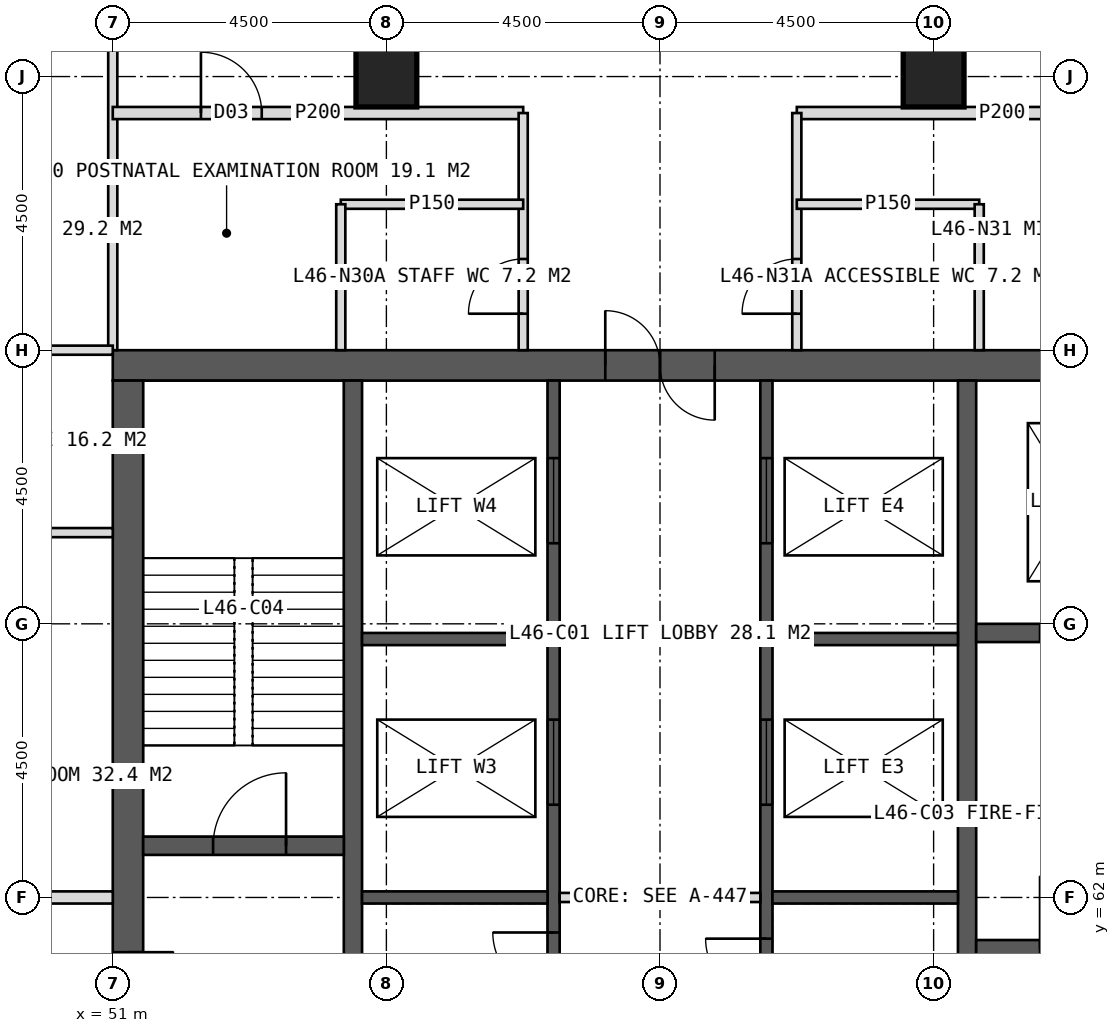
"""IFC4 building model, lengths in metres.
Left out: names, types, materials, properties, quantities, classifications, styles, units other than length and angle.
Written with IfcOpenShell. Run it as: python <this file> out.ifc"""

import sys

from ifc_helpers import new_model, si_unit, direction, frame, frame_2d, origin, origin_2d, place, context, subcontext, project, spatial, rectangle, hollow_rectangle, extrude, element, fill, save


model = new_model("IFC4")
c1 = context("Model", 3, precision=1e-05, world=origin(), true_north=direction((0.0, 1.0)))
c2 = subcontext(c1, "Body", "Model", "MODEL_VIEW")
j1 = project(units=[si_unit("LENGTHUNIT", "METRE"), si_unit("PLANEANGLEUNIT", "RADIAN")], contexts=[c1])
p1 = place(None, origin())
s1 = spatial("IfcSite", under=j1, at=p1, CompositionType="ELEMENT")
p2 = place(p1, origin())
s2 = spatial("IfcBuilding", under=s1, at=p2, CompositionType="ELEMENT")
p3 = place(p2, frame((0.0, 0.0, 193.0)))
s3 = spatial("IfcBuildingStorey", under=s2, at=p3, CompositionType="ELEMENT", Elevation=193.0)
p4 = place(p3, frame((51.0, 70.75, 0.0), z_axis=(0.0, 0.0, 1.0), x_axis=(1.0, 0.0, 0.0)))
e1 = element("IfcWall", 1, at=p4, inside=s3, PredefinedType="SHEAR", context=c2, shape_type="SweptSolid", body=[
    extrude(rectangle(XDim=18.0, YDim=0.5, at=frame_2d((9.0, 0.0))), origin(), (0.0, 0.0, 1.0), 4.0),
])
p5 = place(p4, frame((8.1, 0.0, 0.0)))
e2 = element("IfcOpeningElement", 2, at=p5, cuts=e1, PredefinedType="OPENING", context=c2, shape_type="SweptSolid", body=[
    extrude(rectangle(XDim=1.8, YDim=2.2, at=frame_2d((0.9, 1.1))), frame((0.0, 0.26, 0.0), z_axis=(0.0, -1.0, 0.0), x_axis=(1.0, 0.0, 0.0)), (0.0, 0.0, 1.0), 0.52),
])
p6 = place(p3, frame((51.25, 53.5, 0.0), z_axis=(0.0, 0.0, 1.0), x_axis=(0.0, 1.0, 0.0)))
e3 = element("IfcWall", 3, at=p6, inside=s3, PredefinedType="SHEAR", context=c2, shape_type="SweptSolid", body=[
    extrude(rectangle(XDim=17.0, YDim=0.5, at=frame_2d((8.5, 0.0))), origin(), (0.0, 0.0, 1.0), 4.0),
])
p7 = place(p6, frame((6.1, 0.0, 0.0)))
e4 = element("IfcOpeningElement", 4, at=p7, cuts=e3, PredefinedType="OPENING", context=c2, shape_type="SweptSolid", body=[
    extrude(rectangle(XDim=1.5, YDim=2.2, at=frame_2d((0.75, 1.1))), frame((0.0, 0.26, 0.0), z_axis=(0.0, -1.0, 0.0), x_axis=(1.0, 0.0, 0.0)), (0.0, 0.0, 1.0), 0.52),
])
for number, where, z_axis, x_axis in (
    (5, (54.95, 53.5, 0.0), (0.0, 0.0, 1.0), (0.0, 1.0, 0.0)),
    (6, (65.05, 53.5, 0.0), (0.0, 0.0, 1.0), (0.0, 1.0, 0.0)),
):
    element("IfcWall", number, at=place(p3, frame(where, z_axis=z_axis, x_axis=x_axis)), inside=s3, PredefinedType="SHEAR", context=c2, shape_type="SweptSolid", body=[
        extrude(rectangle(XDim=17.0, YDim=0.3, at=frame_2d((8.5, 0.0))), origin(), (0.0, 0.0, 1.0), 4.0),
    ])
p8 = place(p3, frame((58.25, 53.5, 0.0), z_axis=(0.0, 0.0, 1.0), x_axis=(0.0, 1.0, 0.0)))
e7 = element("IfcWall", 7, at=p8, inside=s3, PredefinedType="SHEAR", context=c2, shape_type="SweptSolid", body=[
    extrude(rectangle(XDim=17.0, YDim=0.2, at=frame_2d((8.5, 0.0))), origin(), (0.0, 0.0, 1.0), 4.0),
])
p9 = place(p8, frame((0.6, 0.0, 0.0)))
e8 = element("IfcOpeningElement", 8, at=p9, cuts=e7, PredefinedType="OPENING", context=c2, shape_type="SweptSolid", body=[
    extrude(rectangle(XDim=1.0, YDim=2.1, at=frame_2d((0.5, 1.05))), frame((0.0, 0.11, 0.0), z_axis=(0.0, -1.0, 0.0), x_axis=(1.0, 0.0, 0.0)), (0.0, 0.0, 1.0), 0.22),
])
p10 = place(p8, frame((2.75, 0.0, 0.0)))
e9 = element("IfcOpeningElement", 9, at=p10, cuts=e7, PredefinedType="OPENING", context=c2, shape_type="SweptSolid", body=[
    extrude(rectangle(XDim=1.0, YDim=2.1, at=frame_2d((0.5, 1.05))), frame((0.0, 0.11, 0.0), z_axis=(0.0, -1.0, 0.0), x_axis=(1.0, 0.0, 0.0)), (0.0, 0.0, 1.0), 0.22),
])
p11 = place(p8, frame((4.824, 0.0, 0.0)))
e10 = element("IfcOpeningElement", 10, at=p11, cuts=e7, PredefinedType="OPENING", context=c2, shape_type="SweptSolid", body=[
    extrude(rectangle(XDim=1.0, YDim=2.1, at=frame_2d((0.5, 1.05))), frame((0.0, 0.11, 0.0), z_axis=(0.0, -1.0, 0.0), x_axis=(1.0, 0.0, 0.0)), (0.0, 0.0, 1.0), 0.22),
])
p12 = place(p8, frame((6.924, 0.0, 0.0)))
e11 = element("IfcOpeningElement", 11, at=p12, cuts=e7, PredefinedType="OPENING", context=c2, shape_type="SweptSolid", body=[
    extrude(rectangle(XDim=1.0, YDim=2.1, at=frame_2d((0.5, 1.05))), frame((0.0, 0.11, 0.0), z_axis=(0.0, -1.0, 0.0), x_axis=(1.0, 0.0, 0.0)), (0.0, 0.0, 1.0), 0.22),
])
p13 = place(p8, frame((10.025, 0.0, 0.0)))
e12 = element("IfcOpeningElement", 12, at=p13, cuts=e7, PredefinedType="OPENING", context=c2, shape_type="SweptSolid", body=[
    extrude(rectangle(XDim=1.4, YDim=2.2, at=frame_2d((0.7, 1.1))), frame((0.0, 0.11, 0.0), z_axis=(0.0, -1.0, 0.0), x_axis=(1.0, 0.0, 0.0)), (0.0, 0.0, 1.0), 0.22),
])
p14 = place(p8, frame((14.325, 0.0, 0.0)))
e13 = element("IfcOpeningElement", 13, at=p14, cuts=e7, PredefinedType="OPENING", context=c2, shape_type="SweptSolid", body=[
    extrude(rectangle(XDim=1.4, YDim=2.2, at=frame_2d((0.7, 1.1))), frame((0.0, 0.11, 0.0), z_axis=(0.0, -1.0, 0.0), x_axis=(1.0, 0.0, 0.0)), (0.0, 0.0, 1.0), 0.22),
])
p15 = place(p3, frame((61.75, 53.5, 0.0), z_axis=(0.0, 0.0, 1.0), x_axis=(0.0, 1.0, 0.0)))
e14 = element("IfcWall", 14, at=p15, inside=s3, PredefinedType="SHEAR", context=c2, shape_type="SweptSolid", body=[
    extrude(rectangle(XDim=17.0, YDim=0.2, at=frame_2d((8.5, 0.0))), origin(), (0.0, 0.0, 1.0), 4.0),
])
p16 = place(p15, frame((0.808, 0.0, 0.0)))
e15 = element("IfcOpeningElement", 15, at=p16, cuts=e14, PredefinedType="OPENING", context=c2, shape_type="SweptSolid", body=[
    extrude(rectangle(XDim=1.0, YDim=2.1, at=frame_2d((0.5, 1.05))), frame((0.0, 0.11, 0.0), z_axis=(0.0, -1.0, 0.0), x_axis=(1.0, 0.0, 0.0)), (0.0, 0.0, 1.0), 0.22),
])
p17 = place(p15, frame((2.958, 0.0, 0.0)))
e16 = element("IfcOpeningElement", 16, at=p17, cuts=e14, PredefinedType="OPENING", context=c2, shape_type="SweptSolid", body=[
    extrude(rectangle(XDim=1.0, YDim=2.1, at=frame_2d((0.5, 1.05))), frame((0.0, 0.11, 0.0), z_axis=(0.0, -1.0, 0.0), x_axis=(1.0, 0.0, 0.0)), (0.0, 0.0, 1.0), 0.22),
])
p18 = place(p15, frame((4.722, 0.0, 0.0)))
e17 = element("IfcOpeningElement", 17, at=p18, cuts=e14, PredefinedType="OPENING", context=c2, shape_type="SweptSolid", body=[
    extrude(rectangle(XDim=1.0, YDim=2.1, at=frame_2d((0.5, 1.05))), frame((0.0, 0.11, 0.0), z_axis=(0.0, -1.0, 0.0), x_axis=(1.0, 0.0, 0.0)), (0.0, 0.0, 1.0), 0.22),
])
p19 = place(p15, frame((6.823, 0.0, 0.0)))
e18 = element("IfcOpeningElement", 18, at=p19, cuts=e14, PredefinedType="OPENING", context=c2, shape_type="SweptSolid", body=[
    extrude(rectangle(XDim=1.0, YDim=2.1, at=frame_2d((0.5, 1.05))), frame((0.0, 0.11, 0.0), z_axis=(0.0, -1.0, 0.0), x_axis=(1.0, 0.0, 0.0)), (0.0, 0.0, 1.0), 0.22),
])
p20 = place(p15, frame((10.025, 0.0, 0.0)))
e19 = element("IfcOpeningElement", 19, at=p20, cuts=e14, PredefinedType="OPENING", context=c2, shape_type="SweptSolid", body=[
    extrude(rectangle(XDim=1.4, YDim=2.2, at=frame_2d((0.7, 1.1))), frame((0.0, 0.11, 0.0), z_axis=(0.0, -1.0, 0.0), x_axis=(1.0, 0.0, 0.0)), (0.0, 0.0, 1.0), 0.22),
])
p21 = place(p15, frame((14.325, 0.0, 0.0)))
e20 = element("IfcOpeningElement", 20, at=p21, cuts=e14, PredefinedType="OPENING", context=c2, shape_type="SweptSolid", body=[
    extrude(rectangle(XDim=1.4, YDim=2.2, at=frame_2d((0.7, 1.1))), frame((0.0, 0.11, 0.0), z_axis=(0.0, -1.0, 0.0), x_axis=(1.0, 0.0, 0.0)), (0.0, 0.0, 1.0), 0.22),
])
for number, where, z_axis, x_axis in (
    (21, (55.1, 62.0, 0.0), (0.0, 0.0, 1.0), (1.0, 0.0, 0.0)),
    (22, (61.85, 62.0, 0.0), (0.0, 0.0, 1.0), (1.0, 0.0, 0.0)),
    (23, (55.1, 66.25, 0.0), (0.0, 0.0, 1.0), (1.0, 0.0, 0.0)),
    (24, (61.85, 66.25, 0.0), (0.0, 0.0, 1.0), (1.0, 0.0, 0.0)),
):
    element("IfcWall", number, at=place(p3, frame(where, z_axis=z_axis, x_axis=x_axis)), inside=s3, PredefinedType="SHEAR", context=c2, shape_type="SweptSolid", body=[
        extrude(rectangle(XDim=3.05, YDim=0.2, at=frame_2d((1.525, 0.0))), origin(), (0.0, 0.0, 1.0), 4.0),
    ])
p22 = place(p3, frame((51.5, 62.85, 0.0), z_axis=(0.0, 0.0, 1.0), x_axis=(1.0, 0.0, 0.0)))
e25 = element("IfcWall", 25, at=p22, inside=s3, PredefinedType="SHEAR", context=c2, shape_type="SweptSolid", body=[
    extrude(rectangle(XDim=3.3, YDim=0.3, at=frame_2d((1.65, 0.0))), origin(), (0.0, 0.0, 1.0), 4.0),
])
p23 = place(p22, frame((1.15, 0.0, 0.0)))
e26 = element("IfcOpeningElement", 26, at=p23, cuts=e25, PredefinedType="OPENING", context=c2, shape_type="SweptSolid", body=[
    extrude(rectangle(XDim=1.2, YDim=2.1, at=frame_2d((0.6, 1.05))), frame((0.0, 0.16, 0.0), z_axis=(0.0, -1.0, 0.0), x_axis=(1.0, 0.0, 0.0)), (0.0, 0.0, 1.0), 0.32),
])
p24 = place(p3, frame((65.2, 61.15, 0.0), z_axis=(0.0, 0.0, 1.0), x_axis=(1.0, 0.0, 0.0)))
e27 = element("IfcWall", 27, at=p24, inside=s3, PredefinedType="SHEAR", context=c2, shape_type="SweptSolid", body=[
    extrude(rectangle(XDim=3.3, YDim=0.3, at=frame_2d((1.65, 0.0))), origin(), (0.0, 0.0, 1.0), 4.0),
])
p25 = place(p24, frame((1.05, 0.0, 0.0)))
e28 = element("IfcOpeningElement", 28, at=p25, cuts=e27, PredefinedType="OPENING", context=c2, shape_type="SweptSolid", body=[
    extrude(rectangle(XDim=1.2, YDim=2.1, at=frame_2d((0.6, 1.05))), frame((0.0, 0.16, 0.0), z_axis=(0.0, -1.0, 0.0), x_axis=(1.0, 0.0, 0.0)), (0.0, 0.0, 1.0), 0.32),
])
p26 = place(p3, frame((65.2, 66.35, 0.0), z_axis=(0.0, 0.0, 1.0), x_axis=(1.0, 0.0, 0.0)))
e29 = element("IfcWall", 29, at=p26, inside=s3, PredefinedType="SHEAR", context=c2, shape_type="SweptSolid", body=[
    extrude(rectangle(XDim=3.3, YDim=0.3, at=frame_2d((1.65, 0.0))), origin(), (0.0, 0.0, 1.0), 4.0),
])
p27 = place(p26, frame((1.05, 0.0, 0.0)))
e30 = element("IfcOpeningElement", 30, at=p27, cuts=e29, PredefinedType="OPENING", context=c2, shape_type="SweptSolid", body=[
    extrude(rectangle(XDim=1.2, YDim=2.2, at=frame_2d((0.6, 1.1))), frame((0.0, 0.16, 0.0), z_axis=(0.0, -1.0, 0.0), x_axis=(1.0, 0.0, 0.0)), (0.0, 0.0, 1.0), 0.32),
])
for number, where, z_axis, x_axis in (
    (31, (55.5, 75.5, 0.0), (0.0, 0.0, 1.0), (1.0, 0.0, 0.0)),
    (32, (64.5, 75.5, 0.0), (0.0, 0.0, 1.0), (1.0, 0.0, 0.0)),
):
    element("IfcColumn", number, at=place(p3, frame(where, z_axis=z_axis, x_axis=x_axis)), inside=s3, PredefinedType="COLUMN", context=c2, shape_type="SweptSolid", body=[
        extrude(hollow_rectangle(XDim=1.0, YDim=1.0, WallThickness=0.1, at=origin_2d()), origin(), (0.0, 0.0, 1.0), 4.0),
    ])
p28 = place(p3, frame((51.0, 71.0, 0.0), z_axis=(0.0, 0.0, 1.0), x_axis=(0.0, 1.0, 0.0)))
e33 = element("IfcWall", 33, at=p28, inside=s3, PredefinedType="PARTITIONING", context=c2, shape_type="SweptSolid", body=[
    extrude(rectangle(XDim=5.4, YDim=0.15, at=frame_2d((2.7, 0.0))), origin(), (0.0, 0.0, 1.0), 3.75),
])
p29 = place(p3, frame((51.0, 74.9, 0.0), z_axis=(0.0, 0.0, 1.0), x_axis=(1.0, 0.0, 0.0)))
e34 = element("IfcWall", 34, at=p29, inside=s3, PredefinedType="PARTITIONING", context=c2, shape_type="SweptSolid", body=[
    extrude(rectangle(XDim=6.75, YDim=0.2, at=frame_2d((3.375, 0.0))), origin(), (0.0, 0.0, 1.0), 3.75),
])
p30 = place(p29, frame((1.45, 0.0, 0.0)))
e35 = element("IfcOpeningElement", 35, at=p30, cuts=e34, PredefinedType="OPENING", context=c2, shape_type="SweptSolid", body=[
    extrude(rectangle(XDim=1.0, YDim=2.1, at=frame_2d((0.5, 1.05))), frame((0.0, 0.11, 0.0), z_axis=(0.0, -1.0, 0.0), x_axis=(1.0, 0.0, 0.0)), (0.0, 0.0, 1.0), 0.22),
])
p31 = place(p3, frame((62.25, 74.9, 0.0), z_axis=(0.0, 0.0, 1.0), x_axis=(1.0, 0.0, 0.0)))
e36 = element("IfcWall", 36, at=p31, inside=s3, PredefinedType="PARTITIONING", context=c2, shape_type="SweptSolid", body=[
    extrude(rectangle(XDim=6.75, YDim=0.2, at=frame_2d((3.375, 0.0))), origin(), (0.0, 0.0, 1.0), 3.75),
])
p32 = place(p31, frame((4.3, 0.0, 0.0)))
e37 = element("IfcOpeningElement", 37, at=p32, cuts=e36, PredefinedType="OPENING", context=c2, shape_type="SweptSolid", body=[
    extrude(rectangle(XDim=1.0, YDim=2.1, at=frame_2d((0.5, 1.05))), frame((0.0, 0.11, 0.0), z_axis=(0.0, -1.0, 0.0), x_axis=(1.0, 0.0, 0.0)), (0.0, 0.0, 1.0), 0.22),
])
p33 = place(p3, frame((57.75, 71.0, 0.0), z_axis=(0.0, 0.0, 1.0), x_axis=(0.0, 1.0, 0.0)))
e38 = element("IfcWall", 38, at=p33, inside=s3, PredefinedType="PARTITIONING", context=c2, shape_type="SweptSolid", body=[
    extrude(rectangle(XDim=3.9, YDim=0.15, at=frame_2d((1.95, 0.0))), origin(), (0.0, 0.0, 1.0), 3.75),
])
p34 = place(p33, frame((0.6, 0.0, 0.0)))
e39 = element("IfcOpeningElement", 39, at=p34, cuts=e38, PredefinedType="OPENING", context=c2, shape_type="SweptSolid", body=[
    extrude(rectangle(XDim=0.9, YDim=2.1, at=frame_2d((0.45, 1.05))), frame((0.0, 0.085, 0.0), z_axis=(0.0, -1.0, 0.0), x_axis=(1.0, 0.0, 0.0)), (0.0, 0.0, 1.0), 0.17),
])
p35 = place(p3, frame((62.25, 71.0, 0.0), z_axis=(0.0, 0.0, 1.0), x_axis=(0.0, 1.0, 0.0)))
e40 = element("IfcWall", 40, at=p35, inside=s3, PredefinedType="PARTITIONING", context=c2, shape_type="SweptSolid", body=[
    extrude(rectangle(XDim=3.9, YDim=0.15, at=frame_2d((1.95, 0.0))), origin(), (0.0, 0.0, 1.0), 3.75),
])
p36 = place(p35, frame((0.6, 0.0, 0.0)))
e41 = element("IfcOpeningElement", 41, at=p36, cuts=e40, PredefinedType="OPENING", context=c2, shape_type="SweptSolid", body=[
    extrude(rectangle(XDim=0.9, YDim=2.1, at=frame_2d((0.45, 1.05))), frame((0.0, 0.085, 0.0), z_axis=(0.0, -1.0, 0.0), x_axis=(1.0, 0.0, 0.0)), (0.0, 0.0, 1.0), 0.17),
])
p37 = place(p3, frame((54.75, 73.4, 0.0), z_axis=(0.0, 0.0, 1.0), x_axis=(1.0, 0.0, 0.0)))
e42 = element("IfcWall", 42, at=p37, inside=s3, PredefinedType="PARTITIONING", context=c2, shape_type="SweptSolid", body=[
    extrude(rectangle(XDim=3.0, YDim=0.15, at=frame_2d((1.5, 0.0))), origin(), (0.0, 0.0, 1.0), 3.75),
])
p38 = place(p3, frame((54.75, 71.0, 0.0), z_axis=(0.0, 0.0, 1.0), x_axis=(0.0, 1.0, 0.0)))
e43 = element("IfcWall", 43, at=p38, inside=s3, PredefinedType="PARTITIONING", context=c2, shape_type="SweptSolid", body=[
    extrude(rectangle(XDim=2.4, YDim=0.15, at=frame_2d((1.2, 0.0))), origin(), (0.0, 0.0, 1.0), 3.75),
])
p39 = place(p3, frame((62.25, 73.4, 0.0), z_axis=(0.0, 0.0, 1.0), x_axis=(1.0, 0.0, 0.0)))
e44 = element("IfcWall", 44, at=p39, inside=s3, PredefinedType="PARTITIONING", context=c2, shape_type="SweptSolid", body=[
    extrude(rectangle(XDim=3.0, YDim=0.15, at=frame_2d((1.5, 0.0))), origin(), (0.0, 0.0, 1.0), 3.75),
])
p40 = place(p3, frame((65.25, 71.0, 0.0), z_axis=(0.0, 0.0, 1.0), x_axis=(0.0, 1.0, 0.0)))
e45 = element("IfcWall", 45, at=p40, inside=s3, PredefinedType="PARTITIONING", context=c2, shape_type="SweptSolid", body=[
    extrude(rectangle(XDim=2.4, YDim=0.15, at=frame_2d((1.2, 0.0))), origin(), (0.0, 0.0, 1.0), 3.75),
])
p41 = place(p3, frame((51.0, 62.0, 0.0), z_axis=(0.0, 0.0, 1.0), x_axis=(-1.0, 0.0, 0.0)))
e46 = element("IfcWall", 46, at=p41, inside=s3, PredefinedType="SOLIDWALL", context=c2, shape_type="SweptSolid", body=[
    extrude(rectangle(XDim=5.4, YDim=0.2, at=frame_2d((2.7, 0.0))), origin(), (0.0, 0.0, 1.0), 2.95),
])
for number, where, z_axis, x_axis in (
    (47, (51.0, 68.0, 0.0), (0.0, 0.0, 1.0), (-1.0, 0.0, 0.0)),
    (48, (51.0, 71.0, 0.0), (0.0, 0.0, 1.0), (-1.0, 0.0, 0.0)),
):
    element("IfcWall", number, at=place(p3, frame(where, z_axis=z_axis, x_axis=x_axis)), inside=s3, PredefinedType="PARTITIONING", context=c2, shape_type="SweptSolid", body=[
        extrude(rectangle(XDim=5.4, YDim=0.15, at=frame_2d((2.7, 0.0))), origin(), (0.0, 0.0, 1.0), 3.75),
    ])
p42 = place(p3, frame((58.35, 62.0, 0.0), z_axis=(0.0, 0.0, 1.0), x_axis=(1.0, 0.0, 0.0)))
e49 = element("IfcWall", 49, at=p42, inside=s3, PredefinedType="PARTITIONING", context=c2, shape_type="SweptSolid", body=[
    extrude(rectangle(XDim=3.3, YDim=0.15, at=frame_2d((1.65, 0.0))), origin(), (0.0, 0.0, 1.0), 3.75),
])
p43 = place(p34, origin())
e50 = element("IfcDoor", 50, at=p43, inside=s3, OperationType="SINGLE_SWING_LEFT", PredefinedType="DOOR", context=c2, shape_type="SweptSolid", body=[
    extrude(rectangle(XDim=0.9, YDim=2.1, at=frame_2d((0.45, 1.05))), frame((0.0, 0.025, 0.0), z_axis=(0.0, -1.0, 0.0), x_axis=(1.0, 0.0, 0.0)), (0.0, 0.0, 1.0), 0.05),
])
fill(e39, e50)
p44 = place(p30, origin())
e51 = element("IfcDoor", 51, at=p44, inside=s3, OperationType="SINGLE_SWING_LEFT", PredefinedType="DOOR", context=c2, shape_type="SweptSolid", body=[
    extrude(rectangle(XDim=1.0, YDim=2.1, at=frame_2d((0.5, 1.05))), frame((0.0, 0.025, 0.0), z_axis=(0.0, -1.0, 0.0), x_axis=(1.0, 0.0, 0.0)), (0.0, 0.0, 1.0), 0.05),
])
fill(e35, e51)
p45 = place(p36, origin())
e52 = element("IfcDoor", 52, at=p45, inside=s3, OperationType="SINGLE_SWING_LEFT", PredefinedType="DOOR", context=c2, shape_type="SweptSolid", body=[
    extrude(rectangle(XDim=0.9, YDim=2.1, at=frame_2d((0.45, 1.05))), frame((0.0, 0.025, 0.0), z_axis=(0.0, -1.0, 0.0), x_axis=(1.0, 0.0, 0.0)), (0.0, 0.0, 1.0), 0.05),
])
fill(e41, e52)
p46 = place(p5, origin())
e53 = element("IfcDoor", 53, at=p46, inside=s3, OperationType="DOUBLE_DOOR_SINGLE_SWING", PredefinedType="DOOR", context=c2, shape_type="SweptSolid", body=[
    extrude(rectangle(XDim=1.8, YDim=2.2, at=frame_2d((0.9, 1.1))), frame((0.0, 0.025, 0.0), z_axis=(0.0, -1.0, 0.0), x_axis=(1.0, 0.0, 0.0)), (0.0, 0.0, 1.0), 0.05),
])
fill(e2, e53)
p47 = place(p7, origin())
e54 = element("IfcDoor", 54, at=p47, inside=s3, OperationType="DOUBLE_DOOR_SINGLE_SWING", PredefinedType="DOOR", context=c2, shape_type="SweptSolid", body=[
    extrude(rectangle(XDim=1.5, YDim=2.2, at=frame_2d((0.75, 1.1))), frame((0.0, 0.025, 0.0), z_axis=(0.0, -1.0, 0.0), x_axis=(1.0, 0.0, 0.0)), (0.0, 0.0, 1.0), 0.05),
])
fill(e4, e54)
p48 = place(p23, origin())
e55 = element("IfcDoor", 55, at=p48, inside=s3, OperationType="SINGLE_SWING_RIGHT", PredefinedType="DOOR", context=c2, shape_type="SweptSolid", body=[
    extrude(rectangle(XDim=1.2, YDim=2.1, at=frame_2d((0.6, 1.05))), frame((0.0, 0.025, 0.0), z_axis=(0.0, -1.0, 0.0), x_axis=(1.0, 0.0, 0.0)), (0.0, 0.0, 1.0), 0.05),
])
fill(e26, e55)
p49 = place(p12, origin())
e56 = element("IfcDoor", 56, at=p49, inside=s3, OperationType="SINGLE_SWING_RIGHT", PredefinedType="DOOR", context=c2, shape_type="SweptSolid", body=[
    extrude(rectangle(XDim=1.0, YDim=2.1, at=frame_2d((0.5, 1.05))), frame((0.0, 0.025, 0.0), z_axis=(0.0, -1.0, 0.0), x_axis=(1.0, 0.0, 0.0)), (0.0, 0.0, 1.0), 0.05),
])
fill(e11, e56)
p50 = place(p19, origin())
e57 = element("IfcDoor", 57, at=p50, inside=s3, OperationType="SINGLE_SWING_RIGHT", PredefinedType="DOOR", context=c2, shape_type="SweptSolid", body=[
    extrude(rectangle(XDim=1.0, YDim=2.1, at=frame_2d((0.5, 1.05))), frame((0.0, 0.025, 0.0), z_axis=(0.0, -1.0, 0.0), x_axis=(1.0, 0.0, 0.0)), (0.0, 0.0, 1.0), 0.05),
])
fill(e18, e57)
p51 = place(p13, origin())
e58 = element("IfcDoor", 58, at=p51, inside=s3, OperationType="SLIDING_TO_LEFT", PredefinedType="DOOR", context=c2, shape_type="SweptSolid", body=[
    extrude(rectangle(XDim=1.4, YDim=2.2, at=frame_2d((0.7, 1.1))), frame((0.0, 0.025, 0.0), z_axis=(0.0, -1.0, 0.0), x_axis=(1.0, 0.0, 0.0)), (0.0, 0.0, 1.0), 0.05),
])
fill(e12, e58)
p52 = place(p20, origin())
e59 = element("IfcDoor", 59, at=p52, inside=s3, OperationType="SLIDING_TO_LEFT", PredefinedType="DOOR", context=c2, shape_type="SweptSolid", body=[
    extrude(rectangle(XDim=1.4, YDim=2.2, at=frame_2d((0.7, 1.1))), frame((0.0, 0.025, 0.0), z_axis=(0.0, -1.0, 0.0), x_axis=(1.0, 0.0, 0.0)), (0.0, 0.0, 1.0), 0.05),
])
fill(e19, e59)
p53 = place(p14, origin())
e60 = element("IfcDoor", 60, at=p53, inside=s3, OperationType="SLIDING_TO_LEFT", PredefinedType="DOOR", context=c2, shape_type="SweptSolid", body=[
    extrude(rectangle(XDim=1.4, YDim=2.2, at=frame_2d((0.7, 1.1))), frame((0.0, 0.025, 0.0), z_axis=(0.0, -1.0, 0.0), x_axis=(1.0, 0.0, 0.0)), (0.0, 0.0, 1.0), 0.05),
])
fill(e13, e60)
p54 = place(p21, origin())
e61 = element("IfcDoor", 61, at=p54, inside=s3, OperationType="SLIDING_TO_LEFT", PredefinedType="DOOR", context=c2, shape_type="SweptSolid", body=[
    extrude(rectangle(XDim=1.4, YDim=2.2, at=frame_2d((0.7, 1.1))), frame((0.0, 0.025, 0.0), z_axis=(0.0, -1.0, 0.0), x_axis=(1.0, 0.0, 0.0)), (0.0, 0.0, 1.0), 0.05),
])
fill(e20, e61)
save(model, sys.argv[1])
